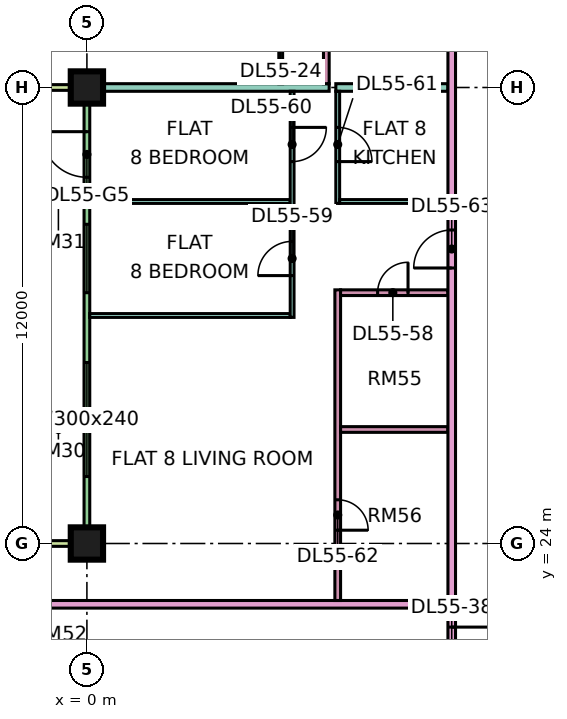
"""IFC4 building model, lengths in metres.
Left out: names, types, materials, properties, quantities, classifications, styles, units other than length and angle.
Written with IfcOpenShell. Run it as: python <this file> out.ifc"""

import sys

from ifc_helpers import new_model, si_unit, direction, frame, frame_2d, origin, origin_2d, place, context, subcontext, project, spatial, rectangle, extrude, element, fill, save


model = new_model("IFC4")
c1 = context("Model", 3, precision=1e-05, world=origin(), true_north=direction((0.0, 1.0)))
c2 = subcontext(c1, "Body", "Model", "MODEL_VIEW")
j1 = project(units=[si_unit("LENGTHUNIT", "METRE"), si_unit("PLANEANGLEUNIT", "RADIAN")], contexts=[c1])
p1 = place(None, origin())
s1 = spatial("IfcSite", under=j1, at=p1, CompositionType="ELEMENT")
p2 = place(p1, origin())
s2 = spatial("IfcBuilding", under=s1, at=p2, CompositionType="ELEMENT")
p3 = place(p2, frame((0.0, 0.0, 234.15)))
s3 = spatial("IfcBuildingStorey", under=s2, at=p3, CompositionType="ELEMENT", Elevation=234.15)
p4 = place(p3, frame((0.0, 24.0, 0.0), z_axis=(0.0, 0.0, 1.0), x_axis=(1.0, 0.0, 0.0)))
e1 = element("IfcColumn", 1, at=p4, inside=s3, PredefinedType="COLUMN", context=c2, shape_type="SweptSolid", body=[
    extrude(rectangle(XDim=0.85, YDim=0.85, at=origin_2d()), origin(), (0.0, 0.0, 1.0), 3.75),
])
p5 = place(p3, frame((0.0, 36.0, 0.0), z_axis=(0.0, 0.0, 1.0), x_axis=(1.0, 0.0, 0.0)))
e2 = element("IfcColumn", 2, at=p5, inside=s3, PredefinedType="COLUMN", context=c2, shape_type="SweptSolid", body=[
    extrude(rectangle(XDim=0.85, YDim=0.85, at=origin_2d()), origin(), (0.0, 0.0, 1.0), 3.75),
])
p6 = place(p3, frame((0.0, 35.925, 0.0), z_axis=(0.0, 0.0, 1.0), x_axis=(0.0, -1.0, 0.0)))
e3 = element("IfcWall", 3, at=p6, inside=s3, PredefinedType="SOLIDWALL", context=c2, shape_type="SweptSolid", body=[
    extrude(rectangle(XDim=11.85, YDim=0.15, at=frame_2d((5.925, 0.0))), origin(), (0.0, 0.0, 1.0), 3.35),
])
p7 = place(p6, frame((1.087, 0.0, 0.0)))
e4 = element("IfcOpeningElement", 4, at=p7, cuts=e3, PredefinedType="OPENING", context=c2, shape_type="SweptSolid", body=[
    extrude(rectangle(XDim=1.2, YDim=2.4, at=frame_2d((0.6, 1.2))), frame((0.0, 0.085, 0.0), z_axis=(0.0, -1.0, 0.0), x_axis=(1.0, 0.0, 0.0)), (0.0, 0.0, 1.0), 0.17),
])
p8 = place(p6, frame((3.525, 0.0, 0.45)))
e5 = element("IfcOpeningElement", 5, at=p8, cuts=e3, PredefinedType="OPENING", context=c2, shape_type="SweptSolid", body=[
    extrude(rectangle(XDim=1.8, YDim=2.4, at=frame_2d((0.9, 1.2))), frame((0.0, 0.085, 0.0), z_axis=(0.0, -1.0, 0.0), x_axis=(1.0, 0.0, 0.0)), (0.0, 0.0, 1.0), 0.17),
])
p9 = place(p6, frame((7.163, 0.0, 0.45)))
e6 = element("IfcOpeningElement", 6, at=p9, cuts=e3, PredefinedType="OPENING", context=c2, shape_type="SweptSolid", body=[
    extrude(rectangle(XDim=3.0, YDim=2.4, at=frame_2d((1.5, 1.2))), frame((0.0, 0.085, 0.0), z_axis=(0.0, -1.0, 0.0), x_axis=(1.0, 0.0, 0.0)), (0.0, 0.0, 1.0), 0.17),
])
for number, where, z_axis, x_axis in (
    (7, (-1.5, 36.0, 0.0), (0.0, 0.0, 1.0), (1.0, 0.0, 0.0)),
    (8, (-1.5, 24.0, 0.0), (0.0, 0.0, 1.0), (1.0, 0.0, 0.0)),
):
    element("IfcWall", number, at=place(p3, frame(where, z_axis=z_axis, x_axis=x_axis)), inside=s3, PredefinedType="SOLIDWALL", context=c2, shape_type="SweptSolid", body=[
        extrude(rectangle(XDim=1.5, YDim=0.15, at=frame_2d((0.75, 0.0))), origin(), (0.0, 0.0, 1.0), 3.35),
    ])
p10 = place(p3, frame((-1.35, 22.4, 0.0), z_axis=(0.0, 0.0, 1.0), x_axis=(1.0, 0.0, 0.0)))
e9 = element("IfcWall", 9, at=p10, inside=s3, PredefinedType="PARTITIONING", context=c2, shape_type="SweptSolid", body=[
    extrude(rectangle(XDim=10.85, YDim=0.2, at=frame_2d((5.425, 0.0))), origin(), (0.0, 0.0, 1.0), 3.35),
])
e10 = element("IfcWall", 10, at=p5, inside=s3, PredefinedType="PARTITIONING", context=c2, shape_type="SweptSolid", body=[
    extrude(rectangle(XDim=6.375, YDim=0.2, at=frame_2d((3.188, 0.0))), origin(), (0.0, 0.0, 1.0), 3.35),
])
for number, where, z_axis, x_axis in (
    (11, (0.074, 30.0, 0.0), (0.0, 0.0, 1.0), (1.0, 0.0, 0.0)),
    (12, (0.074, 33.0, 0.0), (0.0, 0.0, 1.0), (1.0, 0.0, 0.0)),
):
    element("IfcWall", number, at=place(p3, frame(where, z_axis=z_axis, x_axis=x_axis)), inside=s3, PredefinedType="PARTITIONING", context=c2, shape_type="SweptSolid", body=[
        extrude(rectangle(XDim=5.276, YDim=0.1, at=frame_2d((2.638, 0.0))), origin(), (0.0, 0.0, 1.0), 3.35),
    ])
p11 = place(p3, frame((5.1, 36.1, 0.0), z_axis=(0.0, 0.0, 1.0), x_axis=(0.0, 1.0, 0.0)))
e13 = element("IfcWall", 13, at=p11, inside=s3, PredefinedType="PARTITIONING", context=c2, shape_type="SweptSolid", body=[
    extrude(rectangle(XDim=2.85, YDim=0.1, at=frame_2d((1.425, 0.0))), origin(), (0.0, 0.0, 1.0), 3.35),
])
p12 = place(p11, frame((0.95, 0.0, 0.0)))
e14 = element("IfcOpeningElement", 14, at=p12, cuts=e13, PredefinedType="OPENING", context=c2, shape_type="SweptSolid", body=[
    extrude(rectangle(XDim=0.9, YDim=2.1, at=frame_2d((0.45, 1.05))), frame((0.0, 0.06, 0.0), z_axis=(0.0, -1.0, 0.0), x_axis=(1.0, 0.0, 0.0)), (0.0, 0.0, 1.0), 0.12),
])
p13 = place(p3, frame((5.4, 29.95, 0.0), z_axis=(0.0, 0.0, 1.0), x_axis=(0.0, 1.0, 0.0)))
e15 = element("IfcWall", 15, at=p13, inside=s3, PredefinedType="PARTITIONING", context=c2, shape_type="SweptSolid", body=[
    extrude(rectangle(XDim=5.95, YDim=0.1, at=frame_2d((2.975, 0.0))), origin(), (0.0, 0.0, 1.0), 3.35),
])
p14 = place(p13, frame((1.1, 0.0, 0.0)))
e16 = element("IfcOpeningElement", 16, at=p14, cuts=e15, PredefinedType="OPENING", context=c2, shape_type="SweptSolid", body=[
    extrude(rectangle(XDim=0.9, YDim=2.1, at=frame_2d((0.45, 1.05))), frame((0.0, 0.06, 0.0), z_axis=(0.0, -1.0, 0.0), x_axis=(1.0, 0.0, 0.0)), (0.0, 0.0, 1.0), 0.12),
])
p15 = place(p13, frame((4.1, 0.0, 0.0)))
e17 = element("IfcOpeningElement", 17, at=p15, cuts=e15, PredefinedType="OPENING", context=c2, shape_type="SweptSolid", body=[
    extrude(rectangle(XDim=0.9, YDim=2.1, at=frame_2d((0.45, 1.05))), frame((0.0, 0.06, 0.0), z_axis=(0.0, -1.0, 0.0), x_axis=(1.0, 0.0, 0.0)), (0.0, 0.0, 1.0), 0.12),
])
p16 = place(p3, frame((6.3, 36.1, 0.0), z_axis=(0.0, 0.0, 1.0), x_axis=(0.0, 1.0, 0.0)))
e18 = element("IfcWall", 18, at=p16, inside=s3, PredefinedType="PARTITIONING", context=c2, shape_type="SweptSolid", body=[
    extrude(rectangle(XDim=11.975, YDim=0.15, at=frame_2d((5.987, 0.0))), origin(), (0.0, 0.0, 1.0), 3.35),
])
p17 = place(p16, frame((6.95, 0.0, 0.0)))
e19 = element("IfcOpeningElement", 19, at=p17, cuts=e18, PredefinedType="OPENING", context=c2, shape_type="SweptSolid", body=[
    extrude(rectangle(XDim=0.8, YDim=2.1, at=frame_2d((0.4, 1.05))), frame((0.0, 0.085, 0.0), z_axis=(0.0, -1.0, 0.0), x_axis=(1.0, 0.0, 0.0)), (0.0, 0.0, 1.0), 0.17),
])
p18 = place(p16, frame((2.15, 0.0, 0.0)))
e20 = element("IfcOpeningElement", 20, at=p18, cuts=e18, PredefinedType="OPENING", context=c2, shape_type="SweptSolid", body=[
    extrude(rectangle(XDim=0.9, YDim=2.1, at=frame_2d((0.45, 1.05))), frame((0.0, 0.085, 0.0), z_axis=(0.0, -1.0, 0.0), x_axis=(1.0, 0.0, 0.0)), (0.0, 0.0, 1.0), 0.17),
])
p19 = place(p16, frame((10.25, 0.0, 0.0)))
e21 = element("IfcOpeningElement", 21, at=p19, cuts=e18, PredefinedType="OPENING", context=c2, shape_type="SweptSolid", body=[
    extrude(rectangle(XDim=0.8, YDim=2.1, at=frame_2d((0.4, 1.05))), frame((0.0, 0.085, 0.0), z_axis=(0.0, -1.0, 0.0), x_axis=(1.0, 0.0, 0.0)), (0.0, 0.0, 1.0), 0.17),
])
p20 = place(p3, frame((6.55, 36.0, 0.0), z_axis=(0.0, 0.0, 1.0), x_axis=(1.0, 0.0, 0.0)))
e22 = element("IfcWall", 22, at=p20, inside=s3, PredefinedType="PARTITIONING", context=c2, shape_type="SweptSolid", body=[
    extrude(rectangle(XDim=2.95, YDim=0.2, at=frame_2d((1.475, 0.0))), origin(), (0.0, 0.0, 1.0), 3.35),
])
p21 = place(p3, frame((6.6, 22.5, 0.0), z_axis=(0.0, 0.0, 1.0), x_axis=(0.0, 1.0, 0.0)))
e23 = element("IfcWall", 23, at=p21, inside=s3, PredefinedType="PARTITIONING", context=c2, shape_type="SweptSolid", body=[
    extrude(rectangle(XDim=8.175, YDim=0.15, at=frame_2d((4.087, 0.0))), origin(), (0.0, 0.0, 1.0), 3.35),
])
p22 = place(p21, frame((1.85, 0.0, 0.0)))
e24 = element("IfcOpeningElement", 24, at=p22, cuts=e23, PredefinedType="OPENING", context=c2, shape_type="SweptSolid", body=[
    extrude(rectangle(XDim=0.8, YDim=2.1, at=frame_2d((0.4, 1.05))), frame((0.0, 0.085, 0.0), z_axis=(0.0, -1.0, 0.0), x_axis=(1.0, 0.0, 0.0)), (0.0, 0.0, 1.0), 0.17),
])
p23 = place(p3, frame((6.6, 32.95, 0.0), z_axis=(0.0, 0.0, 1.0), x_axis=(0.0, 1.0, 0.0)))
e25 = element("IfcWall", 25, at=p23, inside=s3, PredefinedType="PARTITIONING", context=c2, shape_type="SweptSolid", body=[
    extrude(rectangle(XDim=2.95, YDim=0.1, at=frame_2d((1.475, 0.0))), origin(), (0.0, 0.0, 1.0), 3.35),
])
p24 = place(p23, frame((1.1, 0.0, 0.0)))
e26 = element("IfcOpeningElement", 26, at=p24, cuts=e25, PredefinedType="OPENING", context=c2, shape_type="SweptSolid", body=[
    extrude(rectangle(XDim=0.9, YDim=2.1, at=frame_2d((0.45, 1.05))), frame((0.0, 0.06, 0.0), z_axis=(0.0, -1.0, 0.0), x_axis=(1.0, 0.0, 0.0)), (0.0, 0.0, 1.0), 0.12),
])
p25 = place(p3, frame((6.65, 33.0, 0.0), z_axis=(0.0, 0.0, 1.0), x_axis=(1.0, 0.0, 0.0)))
e27 = element("IfcWall", 27, at=p25, inside=s3, PredefinedType="PARTITIONING", context=c2, shape_type="SweptSolid", body=[
    extrude(rectangle(XDim=2.85, YDim=0.1, at=frame_2d((1.425, 0.0))), origin(), (0.0, 0.0, 1.0), 3.35),
])
p26 = place(p3, frame((6.675, 27.0, 0.0), z_axis=(0.0, 0.0, 1.0), x_axis=(1.0, 0.0, 0.0)))
e28 = element("IfcWall", 28, at=p26, inside=s3, PredefinedType="PARTITIONING", context=c2, shape_type="SweptSolid", body=[
    extrude(rectangle(XDim=2.825, YDim=0.15, at=frame_2d((1.413, 0.0))), origin(), (0.0, 0.0, 1.0), 3.35),
])
p27 = place(p3, frame((6.675, 30.6, 0.0), z_axis=(0.0, 0.0, 1.0), x_axis=(1.0, 0.0, 0.0)))
e29 = element("IfcWall", 29, at=p27, inside=s3, PredefinedType="PARTITIONING", context=c2, shape_type="SweptSolid", body=[
    extrude(rectangle(XDim=2.825, YDim=0.15, at=frame_2d((1.413, 0.0))), origin(), (0.0, 0.0, 1.0), 3.35),
])
p28 = place(p27, frame((0.975, 0.0, 0.0)))
e30 = element("IfcOpeningElement", 30, at=p28, cuts=e29, PredefinedType="OPENING", context=c2, shape_type="SweptSolid", body=[
    extrude(rectangle(XDim=0.8, YDim=2.1, at=frame_2d((0.4, 1.05))), frame((0.0, 0.085, 0.0), z_axis=(0.0, -1.0, 0.0), x_axis=(1.0, 0.0, 0.0)), (0.0, 0.0, 1.0), 0.17),
])
p29 = place(p3, frame((9.6, 20.0, 0.0), z_axis=(0.0, 0.0, 1.0), x_axis=(0.0, 1.0, 0.0)))
e31 = element("IfcWall", 31, at=p29, inside=s3, PredefinedType="PARTITIONING", context=c2, shape_type="SweptSolid", body=[
    extrude(rectangle(XDim=42.926, YDim=0.2, at=frame_2d((21.463, 0.0))), origin(), (0.0, 0.0, 1.0), 3.35),
])
p30 = place(p29, frame((28.95, 0.0, 0.0)))
e32 = element("IfcOpeningElement", 32, at=p30, cuts=e31, PredefinedType="OPENING", context=c2, shape_type="SweptSolid", body=[
    extrude(rectangle(XDim=1.0, YDim=2.1, at=frame_2d((0.5, 1.05))), frame((0.0, 0.11, 0.0), z_axis=(0.0, -1.0, 0.0), x_axis=(1.0, 0.0, 0.0)), (0.0, 0.0, 1.0), 0.22),
])
p31 = place(p29, frame((31.95, 0.0, 0.0)))
e33 = element("IfcOpeningElement", 33, at=p31, cuts=e31, PredefinedType="OPENING", context=c2, shape_type="SweptSolid", body=[
    extrude(rectangle(XDim=1.0, YDim=2.1, at=frame_2d((0.5, 1.05))), frame((0.0, 0.11, 0.0), z_axis=(0.0, -1.0, 0.0), x_axis=(1.0, 0.0, 0.0)), (0.0, 0.0, 1.0), 0.22),
])
p32 = place(p29, frame((0.6, 0.0, 0.0)))
e34 = element("IfcOpeningElement", 34, at=p32, cuts=e31, PredefinedType="OPENING", context=c2, shape_type="SweptSolid", body=[
    extrude(rectangle(XDim=1.2, YDim=2.1, at=frame_2d((0.6, 1.05))), frame((0.0, 0.11, 0.0), z_axis=(0.0, -1.0, 0.0), x_axis=(1.0, 0.0, 0.0)), (0.0, 0.0, 1.0), 0.22),
])
p33 = place(p29, frame((11.25, 0.0, 0.0)))
e35 = element("IfcOpeningElement", 35, at=p33, cuts=e31, PredefinedType="OPENING", context=c2, shape_type="SweptSolid", body=[
    extrude(rectangle(XDim=1.0, YDim=2.1, at=frame_2d((0.5, 1.05))), frame((0.0, 0.11, 0.0), z_axis=(0.0, -1.0, 0.0), x_axis=(1.0, 0.0, 0.0)), (0.0, 0.0, 1.0), 0.22),
])
p34 = place(p7, frame((1.2, 0.0, 0.0), z_axis=(0.0, 0.0, 1.0), x_axis=(-1.0, 0.0, 0.0)))
e36 = element("IfcDoor", 36, at=p34, inside=s3, OperationType="DOUBLE_DOOR_SINGLE_SWING", PredefinedType="DOOR", context=c2, shape_type="SweptSolid", body=[
    extrude(rectangle(XDim=1.2, YDim=2.4, at=frame_2d((0.6, 1.2))), frame((0.0, 0.025, 0.0), z_axis=(0.0, -1.0, 0.0), x_axis=(1.0, 0.0, 0.0)), (0.0, 0.0, 1.0), 0.05),
])
fill(e4, e36)
p35 = place(p8, origin())
e37 = element("IfcWindow", 37, at=p35, inside=s3, PartitioningType="SINGLE_PANEL", PredefinedType="WINDOW", context=c2, shape_type="SweptSolid", body=[
    extrude(rectangle(XDim=1.8, YDim=2.4, at=frame_2d((0.9, 1.2))), frame((0.0, 0.03, 0.0), z_axis=(0.0, -1.0, 0.0), x_axis=(1.0, 0.0, 0.0)), (0.0, 0.0, 1.0), 0.06),
])
fill(e5, e37)
p36 = place(p9, origin())
e38 = element("IfcWindow", 38, at=p36, inside=s3, PartitioningType="SINGLE_PANEL", PredefinedType="WINDOW", context=c2, shape_type="SweptSolid", body=[
    extrude(rectangle(XDim=3.0, YDim=2.4, at=frame_2d((1.5, 1.2))), frame((0.0, 0.03, 0.0), z_axis=(0.0, -1.0, 0.0), x_axis=(1.0, 0.0, 0.0)), (0.0, 0.0, 1.0), 0.06),
])
fill(e6, e38)
p37 = place(p32, origin())
e39 = element("IfcDoor", 39, at=p37, inside=s3, OperationType="SINGLE_SWING_RIGHT", PredefinedType="DOOR", context=c2, shape_type="SweptSolid", body=[
    extrude(rectangle(XDim=1.2, YDim=2.1, at=frame_2d((0.6, 1.05))), frame((0.0, 0.025, 0.0), z_axis=(0.0, -1.0, 0.0), x_axis=(1.0, 0.0, 0.0)), (0.0, 0.0, 1.0), 0.05),
])
fill(e34, e39)
p38 = place(p28, frame((0.8, 0.0, 0.0), z_axis=(0.0, 0.0, 1.0), x_axis=(-1.0, 0.0, 0.0)))
e40 = element("IfcDoor", 40, at=p38, inside=s3, OperationType="SINGLE_SWING_RIGHT", PredefinedType="DOOR", context=c2, shape_type="SweptSolid", body=[
    extrude(rectangle(XDim=0.8, YDim=2.1, at=frame_2d((0.4, 1.05))), frame((0.0, 0.025, 0.0), z_axis=(0.0, -1.0, 0.0), x_axis=(1.0, 0.0, 0.0)), (0.0, 0.0, 1.0), 0.05),
])
fill(e30, e40)
p39 = place(p14, origin())
e41 = element("IfcDoor", 41, at=p39, inside=s3, OperationType="SINGLE_SWING_LEFT", PredefinedType="DOOR", context=c2, shape_type="SweptSolid", body=[
    extrude(rectangle(XDim=0.9, YDim=2.1, at=frame_2d((0.45, 1.05))), frame((0.0, 0.025, 0.0), z_axis=(0.0, -1.0, 0.0), x_axis=(1.0, 0.0, 0.0)), (0.0, 0.0, 1.0), 0.05),
])
fill(e16, e41)
p40 = place(p15, origin())
e42 = element("IfcDoor", 42, at=p40, inside=s3, OperationType="SINGLE_SWING_RIGHT", PredefinedType="DOOR", context=c2, shape_type="SweptSolid", body=[
    extrude(rectangle(XDim=0.9, YDim=2.1, at=frame_2d((0.45, 1.05))), frame((0.0, 0.025, 0.0), z_axis=(0.0, -1.0, 0.0), x_axis=(1.0, 0.0, 0.0)), (0.0, 0.0, 1.0), 0.05),
])
fill(e17, e42)
p41 = place(p24, frame((0.9, 0.0, 0.0), z_axis=(0.0, 0.0, 1.0), x_axis=(-1.0, 0.0, 0.0)))
e43 = element("IfcDoor", 43, at=p41, inside=s3, OperationType="SINGLE_SWING_LEFT", PredefinedType="DOOR", context=c2, shape_type="SweptSolid", body=[
    extrude(rectangle(XDim=0.9, YDim=2.1, at=frame_2d((0.45, 1.05))), frame((0.0, 0.025, 0.0), z_axis=(0.0, -1.0, 0.0), x_axis=(1.0, 0.0, 0.0)), (0.0, 0.0, 1.0), 0.05),
])
fill(e26, e43)
p42 = place(p22, frame((0.8, 0.0, 0.0), z_axis=(0.0, 0.0, 1.0), x_axis=(-1.0, 0.0, 0.0)))
e44 = element("IfcDoor", 44, at=p42, inside=s3, OperationType="SINGLE_SWING_LEFT", PredefinedType="DOOR", context=c2, shape_type="SweptSolid", body=[
    extrude(rectangle(XDim=0.8, YDim=2.1, at=frame_2d((0.4, 1.05))), frame((0.0, 0.025, 0.0), z_axis=(0.0, -1.0, 0.0), x_axis=(1.0, 0.0, 0.0)), (0.0, 0.0, 1.0), 0.05),
])
fill(e24, e44)
p43 = place(p33, origin())
e45 = element("IfcDoor", 45, at=p43, inside=s3, OperationType="SINGLE_SWING_LEFT", PredefinedType="DOOR", context=c2, shape_type="SweptSolid", body=[
    extrude(rectangle(XDim=1.0, YDim=2.1, at=frame_2d((0.5, 1.05))), frame((0.0, 0.025, 0.0), z_axis=(0.0, -1.0, 0.0), x_axis=(1.0, 0.0, 0.0)), (0.0, 0.0, 1.0), 0.05),
])
fill(e35, e45)
save(model, sys.argv[1])
